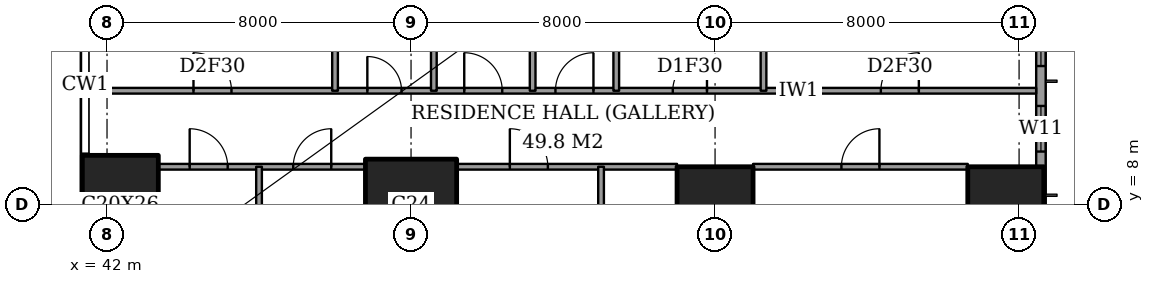
"""IFC4 building model, lengths in metres.
Left out: names, types, materials, properties, quantities, classifications, styles, units other than length and angle.
Written with IfcOpenShell. Run it as: python <this file> out.ifc"""

import sys

from ifc_helpers import new_model, si_unit, direction, frame, frame_2d, origin, origin_2d, place, context, subcontext, project, spatial, rectangle, extrude, element, fill, save


model = new_model("IFC4")
c1 = context("Model", 3, precision=1e-05, world=origin(), true_north=direction((0.0, 1.0)))
c2 = subcontext(c1, "Body", "Model", "MODEL_VIEW")
j1 = project(units=[si_unit("LENGTHUNIT", "METRE"), si_unit("PLANEANGLEUNIT", "RADIAN")], contexts=[c1])
p1 = place(None, origin())
s1 = spatial("IfcSite", under=j1, at=p1, CompositionType="ELEMENT")
p2 = place(p1, origin())
s2 = spatial("IfcBuilding", under=s1, at=p2, CompositionType="ELEMENT")
p3 = place(p2, frame((0.0, 0.0, 161.0)))
s3 = spatial("IfcBuildingStorey", under=s2, at=p3, CompositionType="ELEMENT", Elevation=161.0)
p4 = place(p3, frame((42.35, 8.0, 0.0), z_axis=(0.0, 0.0, 1.0), x_axis=(1.0, 0.0, 0.0)))
e1 = element("IfcColumn", 1, at=p4, inside=s3, PredefinedType="COLUMN", context=c2, shape_type="SweptSolid", body=[
    extrude(rectangle(XDim=2.0, YDim=2.6, at=origin_2d()), origin(), (0.0, 0.0, 1.0), 3.6),
])
p5 = place(p3, frame((50.0, 8.0, 0.0), z_axis=(0.0, 0.0, 1.0), x_axis=(1.0, 0.0, 0.0)))
e2 = element("IfcColumn", 2, at=p5, inside=s3, PredefinedType="COLUMN", context=c2, shape_type="SweptSolid", body=[
    extrude(rectangle(XDim=2.4, YDim=2.4, at=origin_2d()), origin(), (0.0, 0.0, 1.0), 3.6),
])
for number, where, z_axis, x_axis in (
    (3, (58.0, 8.0, 0.0), (0.0, 0.0, 1.0), (1.0, 0.0, 0.0)),
    (4, (65.65, 8.0, 0.0), (0.0, 0.0, 1.0), (1.0, 0.0, 0.0)),
):
    element("IfcColumn", number, at=place(p3, frame(where, z_axis=z_axis, x_axis=x_axis)), inside=s3, PredefinedType="COLUMN", context=c2, shape_type="SweptSolid", body=[
        extrude(rectangle(XDim=2.0, YDim=2.0, at=origin_2d()), origin(), (0.0, 0.0, 1.0), 3.6),
    ])
p6 = place(p3, frame((66.575, 3.175, 0.0), z_axis=(0.0, 0.0, 1.0), x_axis=(0.0, 1.0, 0.0)))
e5 = element("IfcWall", 5, at=p6, inside=s3, PredefinedType="SOLIDWALL", context=c2, shape_type="SweptSolid", body=[
    extrude(rectangle(XDim=41.65, YDim=0.25, at=frame_2d((20.825, 0.0))), origin(), (0.0, 0.0, 1.0), 3.6),
])
p7 = place(p6, frame((0.775, 0.0, 0.4)))
e6 = element("IfcOpeningElement", 6, at=p7, cuts=e5, PredefinedType="OPENING", context=c2, shape_type="SweptSolid", body=[
    extrude(rectangle(XDim=2.4, YDim=2.2, at=frame_2d((1.2, 1.1))), frame((0.0, 0.135, 0.0), z_axis=(0.0, -1.0, 0.0), x_axis=(1.0, 0.0, 0.0)), (0.0, 0.0, 1.0), 0.27),
])
p8 = place(p6, frame((6.225, 0.0, 0.4)))
e7 = element("IfcOpeningElement", 7, at=p8, cuts=e5, PredefinedType="OPENING", context=c2, shape_type="SweptSolid", body=[
    extrude(rectangle(XDim=1.2, YDim=2.2, at=frame_2d((0.6, 1.1))), frame((0.0, 0.135, 0.0), z_axis=(0.0, -1.0, 0.0), x_axis=(1.0, 0.0, 0.0)), (0.0, 0.0, 1.0), 0.27),
])
p9 = place(p6, frame((8.475, 0.0, 0.4)))
e8 = element("IfcOpeningElement", 8, at=p9, cuts=e5, PredefinedType="OPENING", context=c2, shape_type="SweptSolid", body=[
    extrude(rectangle(XDim=2.4, YDim=2.2, at=frame_2d((1.2, 1.1))), frame((0.0, 0.135, 0.0), z_axis=(0.0, -1.0, 0.0), x_axis=(1.0, 0.0, 0.0)), (0.0, 0.0, 1.0), 0.27),
])
p10 = place(p6, frame((15.775, 0.0, 0.4)))
e9 = element("IfcOpeningElement", 9, at=p10, cuts=e5, PredefinedType="OPENING", context=c2, shape_type="SweptSolid", body=[
    extrude(rectangle(XDim=2.4, YDim=2.2, at=frame_2d((1.2, 1.1))), frame((0.0, 0.135, 0.0), z_axis=(0.0, -1.0, 0.0), x_axis=(1.0, 0.0, 0.0)), (0.0, 0.0, 1.0), 0.27),
])
p11 = place(p6, frame((23.475, 0.0, 0.4)))
e10 = element("IfcOpeningElement", 10, at=p11, cuts=e5, PredefinedType="OPENING", context=c2, shape_type="SweptSolid", body=[
    extrude(rectangle(XDim=2.4, YDim=2.2, at=frame_2d((1.2, 1.1))), frame((0.0, 0.135, 0.0), z_axis=(0.0, -1.0, 0.0), x_axis=(1.0, 0.0, 0.0)), (0.0, 0.0, 1.0), 0.27),
])
p12 = place(p6, frame((30.975, 0.0, 0.4)))
e11 = element("IfcOpeningElement", 11, at=p12, cuts=e5, PredefinedType="OPENING", context=c2, shape_type="SweptSolid", body=[
    extrude(rectangle(XDim=2.4, YDim=2.2, at=frame_2d((1.2, 1.1))), frame((0.0, 0.135, 0.0), z_axis=(0.0, -1.0, 0.0), x_axis=(1.0, 0.0, 0.0)), (0.0, 0.0, 1.0), 0.27),
])
p13 = place(p6, frame((34.5, 0.0, 0.4)))
e12 = element("IfcOpeningElement", 12, at=p13, cuts=e5, PredefinedType="OPENING", context=c2, shape_type="SweptSolid", body=[
    extrude(rectangle(XDim=1.2, YDim=2.2, at=frame_2d((0.6, 1.1))), frame((0.0, 0.135, 0.0), z_axis=(0.0, -1.0, 0.0), x_axis=(1.0, 0.0, 0.0)), (0.0, 0.0, 1.0), 0.27),
])
p14 = place(p6, frame((38.475, 0.0, 0.4)))
e13 = element("IfcOpeningElement", 13, at=p14, cuts=e5, PredefinedType="OPENING", context=c2, shape_type="SweptSolid", body=[
    extrude(rectangle(XDim=2.4, YDim=2.2, at=frame_2d((1.2, 1.1))), frame((0.0, 0.135, 0.0), z_axis=(0.0, -1.0, 0.0), x_axis=(1.0, 0.0, 0.0)), (0.0, 0.0, 1.0), 0.27),
])
p15 = place(p3, frame((43.35, 9.0, 0.0), z_axis=(0.0, 0.0, 1.0), x_axis=(1.0, 0.0, 0.0)))
e14 = element("IfcWall", 14, at=p15, inside=s3, PredefinedType="PARTITIONING", context=c2, shape_type="SweptSolid", body=[
    extrude(rectangle(XDim=5.45, YDim=0.15, at=frame_2d((2.725, 0.0))), origin(), (0.0, 0.0, 1.0), 3.35),
])
p16 = place(p15, frame((3.55, 0.0, 0.0)))
e15 = element("IfcOpeningElement", 15, at=p16, cuts=e14, PredefinedType="OPENING", context=c2, shape_type="SweptSolid", body=[
    extrude(rectangle(XDim=1.0, YDim=2.1, at=frame_2d((0.5, 1.05))), frame((0.0, 0.085, 0.0), z_axis=(0.0, -1.0, 0.0), x_axis=(1.0, 0.0, 0.0)), (0.0, 0.0, 1.0), 0.17),
])
p17 = place(p15, frame((0.825, 0.0, 0.0)))
e16 = element("IfcOpeningElement", 16, at=p17, cuts=e14, PredefinedType="OPENING", context=c2, shape_type="SweptSolid", body=[
    extrude(rectangle(XDim=1.0, YDim=2.1, at=frame_2d((0.5, 1.05))), frame((0.0, 0.085, 0.0), z_axis=(0.0, -1.0, 0.0), x_axis=(1.0, 0.0, 0.0)), (0.0, 0.0, 1.0), 0.17),
])
p18 = place(p3, frame((51.2, 9.0, 0.0), z_axis=(0.0, 0.0, 1.0), x_axis=(1.0, 0.0, 0.0)))
e17 = element("IfcWall", 17, at=p18, inside=s3, PredefinedType="PARTITIONING", context=c2, shape_type="SweptSolid", body=[
    extrude(rectangle(XDim=5.8, YDim=0.15, at=frame_2d((2.9, 0.0))), origin(), (0.0, 0.0, 1.0), 3.35),
])
p19 = place(p18, frame((1.4, 0.0, 0.0)))
e18 = element("IfcOpeningElement", 18, at=p19, cuts=e17, PredefinedType="OPENING", context=c2, shape_type="SweptSolid", body=[
    extrude(rectangle(XDim=1.0, YDim=2.1, at=frame_2d((0.5, 1.05))), frame((0.0, 0.085, 0.0), z_axis=(0.0, -1.0, 0.0), x_axis=(1.0, 0.0, 0.0)), (0.0, 0.0, 1.0), 0.17),
])
p20 = place(p3, frame((59.0, 9.0, 0.0), z_axis=(0.0, 0.0, 1.0), x_axis=(1.0, 0.0, 0.0)))
e19 = element("IfcWall", 19, at=p20, inside=s3, PredefinedType="PARTITIONING", context=c2, shape_type="SweptSolid", body=[
    extrude(rectangle(XDim=5.65, YDim=0.15, at=frame_2d((2.825, 0.0))), origin(), (0.0, 0.0, 1.0), 3.35),
])
p21 = place(p20, frame((2.325, 0.0, 0.0)))
e20 = element("IfcOpeningElement", 20, at=p21, cuts=e19, PredefinedType="OPENING", context=c2, shape_type="SweptSolid", body=[
    extrude(rectangle(XDim=1.0, YDim=2.1, at=frame_2d((0.5, 1.05))), frame((0.0, 0.085, 0.0), z_axis=(0.0, -1.0, 0.0), x_axis=(1.0, 0.0, 0.0)), (0.0, 0.0, 1.0), 0.17),
])
p22 = place(p3, frame((41.439, 11.0, 0.0), z_axis=(0.0, 0.0, 1.0), x_axis=(1.0, 0.0, 0.0)))
e21 = element("IfcWall", 21, at=p22, inside=s3, PredefinedType="PARTITIONING", context=c2, shape_type="SweptSolid", body=[
    extrude(rectangle(XDim=25.011, YDim=0.15, at=frame_2d((12.505, 0.0))), origin(), (0.0, 0.0, 1.0), 3.35),
])
p23 = place(p22, frame((12.361, 0.0, 0.0)))
e22 = element("IfcOpeningElement", 22, at=p23, cuts=e21, PredefinedType="OPENING", context=c2, shape_type="SweptSolid", body=[
    extrude(rectangle(XDim=1.0, YDim=2.1, at=frame_2d((0.5, 1.05))), frame((0.0, 0.085, 0.0), z_axis=(0.0, -1.0, 0.0), x_axis=(1.0, 0.0, 0.0)), (0.0, 0.0, 1.0), 0.17),
])
p24 = place(p22, frame((20.924, 0.0, 0.0)))
e23 = element("IfcOpeningElement", 23, at=p24, cuts=e21, PredefinedType="OPENING", context=c2, shape_type="SweptSolid", body=[
    extrude(rectangle(XDim=1.0, YDim=2.1, at=frame_2d((0.5, 1.05))), frame((0.0, 0.085, 0.0), z_axis=(0.0, -1.0, 0.0), x_axis=(1.0, 0.0, 0.0)), (0.0, 0.0, 1.0), 0.17),
])
p25 = place(p22, frame((15.448, 0.0, 0.0)))
e24 = element("IfcOpeningElement", 24, at=p25, cuts=e21, PredefinedType="OPENING", context=c2, shape_type="SweptSolid", body=[
    extrude(rectangle(XDim=0.9, YDim=2.1, at=frame_2d((0.45, 1.05))), frame((0.0, 0.085, 0.0), z_axis=(0.0, -1.0, 0.0), x_axis=(1.0, 0.0, 0.0)), (0.0, 0.0, 1.0), 0.17),
])
p26 = place(p22, frame((9.961, 0.0, 0.0)))
e25 = element("IfcOpeningElement", 25, at=p26, cuts=e21, PredefinedType="OPENING", context=c2, shape_type="SweptSolid", body=[
    extrude(rectangle(XDim=1.0, YDim=2.1, at=frame_2d((0.5, 1.05))), frame((0.0, 0.085, 0.0), z_axis=(0.0, -1.0, 0.0), x_axis=(1.0, 0.0, 0.0)), (0.0, 0.0, 1.0), 0.17),
])
p27 = place(p22, frame((7.411, 0.0, 0.0)))
e26 = element("IfcOpeningElement", 26, at=p27, cuts=e21, PredefinedType="OPENING", context=c2, shape_type="SweptSolid", body=[
    extrude(rectangle(XDim=0.9, YDim=2.1, at=frame_2d((0.45, 1.05))), frame((0.0, 0.085, 0.0), z_axis=(0.0, -1.0, 0.0), x_axis=(1.0, 0.0, 0.0)), (0.0, 0.0, 1.0), 0.17),
])
p28 = place(p22, frame((2.836, 0.0, 0.0)))
e27 = element("IfcOpeningElement", 27, at=p28, cuts=e21, PredefinedType="OPENING", context=c2, shape_type="SweptSolid", body=[
    extrude(rectangle(XDim=1.0, YDim=2.1, at=frame_2d((0.5, 1.05))), frame((0.0, 0.085, 0.0), z_axis=(0.0, -1.0, 0.0), x_axis=(1.0, 0.0, 0.0)), (0.0, 0.0, 1.0), 0.17),
])
p29 = place(p3, frame((46.0, -0.45, 0.0), z_axis=(0.0, 0.0, 1.0), x_axis=(0.0, 1.0, 0.0)))
e28 = element("IfcWall", 28, at=p29, inside=s3, PredefinedType="PARTITIONING", context=c2, shape_type="SweptSolid", body=[
    extrude(rectangle(XDim=9.45, YDim=0.15, at=frame_2d((4.725, 0.0))), origin(), (0.0, 0.0, 1.0), 3.35),
])
p30 = place(p3, frame((48.0, 11.0, 0.0), z_axis=(0.0, 0.0, 1.0), x_axis=(0.0, 1.0, 0.0)))
e29 = element("IfcWall", 29, at=p30, inside=s3, PredefinedType="PARTITIONING", context=c2, shape_type="SweptSolid", body=[
    extrude(rectangle(XDim=6.5, YDim=0.15, at=frame_2d((3.25, 0.0))), origin(), (0.0, 0.0, 1.0), 3.35),
])
p31 = place(p3, frame((50.6, 11.0, 0.0), z_axis=(0.0, 0.0, 1.0), x_axis=(0.0, 1.0, 0.0)))
e30 = element("IfcWall", 30, at=p31, inside=s3, PredefinedType="PARTITIONING", context=c2, shape_type="SweptSolid", body=[
    extrude(rectangle(XDim=3.8, YDim=0.15, at=frame_2d((1.9, 0.0))), origin(), (0.0, 0.0, 1.0), 3.35),
])
p32 = place(p3, frame((53.2, 11.0, 0.0), z_axis=(0.0, 0.0, 1.0), x_axis=(0.0, 1.0, 0.0)))
e31 = element("IfcWall", 31, at=p32, inside=s3, PredefinedType="PARTITIONING", context=c2, shape_type="SweptSolid", body=[
    extrude(rectangle(XDim=6.5, YDim=0.15, at=frame_2d((3.25, 0.0))), origin(), (0.0, 0.0, 1.0), 3.35),
])
p33 = place(p3, frame((55.0, -0.45, 0.0), z_axis=(0.0, 0.0, 1.0), x_axis=(0.0, 1.0, 0.0)))
e32 = element("IfcWall", 32, at=p33, inside=s3, PredefinedType="PARTITIONING", context=c2, shape_type="SweptSolid", body=[
    extrude(rectangle(XDim=9.45, YDim=0.15, at=frame_2d((4.725, 0.0))), origin(), (0.0, 0.0, 1.0), 3.35),
])
p34 = place(p3, frame((55.4, 11.0, 0.0), z_axis=(0.0, 0.0, 1.0), x_axis=(0.0, 1.0, 0.0)))
e33 = element("IfcWall", 33, at=p34, inside=s3, PredefinedType="PARTITIONING", context=c2, shape_type="SweptSolid", body=[
    extrude(rectangle(XDim=10.6, YDim=0.15, at=frame_2d((5.3, 0.0))), origin(), (0.0, 0.0, 1.0), 3.35),
])
p35 = place(p34, frame((8.05, 0.0, 0.0)))
e34 = element("IfcOpeningElement", 34, at=p35, cuts=e33, PredefinedType="OPENING", context=c2, shape_type="SweptSolid", body=[
    extrude(rectangle(XDim=1.0, YDim=2.1, at=frame_2d((0.5, 1.05))), frame((0.0, 0.085, 0.0), z_axis=(0.0, -1.0, 0.0), x_axis=(1.0, 0.0, 0.0)), (0.0, 0.0, 1.0), 0.17),
])
p36 = place(p3, frame((59.275, 11.0, 0.0), z_axis=(0.0, 0.0, 1.0), x_axis=(0.0, 1.0, 0.0)))
e35 = element("IfcWall", 35, at=p36, inside=s3, PredefinedType="PARTITIONING", context=c2, shape_type="SweptSolid", body=[
    extrude(rectangle(XDim=3.8, YDim=0.15, at=frame_2d((1.9, 0.0))), origin(), (0.0, 0.0, 1.0), 3.35),
])
p37 = place(p8, origin())
e36 = element("IfcWindow", 36, at=p37, inside=s3, PartitioningType="SINGLE_PANEL", PredefinedType="WINDOW", context=c2, shape_type="SweptSolid", body=[
    extrude(rectangle(XDim=1.2, YDim=2.2, at=frame_2d((0.6, 1.1))), frame((0.0, 0.03, 0.0), z_axis=(0.0, -1.0, 0.0), x_axis=(1.0, 0.0, 0.0)), (0.0, 0.0, 1.0), 0.06),
])
fill(e7, e36)
p38 = place(p9, origin())
e37 = element("IfcWindow", 37, at=p38, inside=s3, PartitioningType="SINGLE_PANEL", PredefinedType="WINDOW", context=c2, shape_type="SweptSolid", body=[
    extrude(rectangle(XDim=2.4, YDim=2.2, at=frame_2d((1.2, 1.1))), frame((0.0, 0.03, 0.0), z_axis=(0.0, -1.0, 0.0), x_axis=(1.0, 0.0, 0.0)), (0.0, 0.0, 1.0), 0.06),
])
fill(e8, e37)
p39 = place(p21, origin())
e38 = element("IfcDoor", 38, at=p39, inside=s3, OperationType="SINGLE_SWING_LEFT", PredefinedType="DOOR", context=c2, shape_type="SweptSolid", body=[
    extrude(rectangle(XDim=1.0, YDim=2.1, at=frame_2d((0.5, 1.05))), frame((0.0, 0.025, 0.0), z_axis=(0.0, -1.0, 0.0), x_axis=(1.0, 0.0, 0.0)), (0.0, 0.0, 1.0), 0.05),
])
fill(e20, e38)
p40 = place(p19, origin())
e39 = element("IfcDoor", 39, at=p40, inside=s3, OperationType="SINGLE_SWING_RIGHT", PredefinedType="DOOR", context=c2, shape_type="SweptSolid", body=[
    extrude(rectangle(XDim=1.0, YDim=2.1, at=frame_2d((0.5, 1.05))), frame((0.0, 0.025, 0.0), z_axis=(0.0, -1.0, 0.0), x_axis=(1.0, 0.0, 0.0)), (0.0, 0.0, 1.0), 0.05),
])
fill(e18, e39)
p41 = place(p16, origin())
e40 = element("IfcDoor", 40, at=p41, inside=s3, OperationType="SINGLE_SWING_LEFT", PredefinedType="DOOR", context=c2, shape_type="SweptSolid", body=[
    extrude(rectangle(XDim=1.0, YDim=2.1, at=frame_2d((0.5, 1.05))), frame((0.0, 0.025, 0.0), z_axis=(0.0, -1.0, 0.0), x_axis=(1.0, 0.0, 0.0)), (0.0, 0.0, 1.0), 0.05),
])
fill(e15, e40)
p42 = place(p17, origin())
e41 = element("IfcDoor", 41, at=p42, inside=s3, OperationType="SINGLE_SWING_RIGHT", PredefinedType="DOOR", context=c2, shape_type="SweptSolid", body=[
    extrude(rectangle(XDim=1.0, YDim=2.1, at=frame_2d((0.5, 1.05))), frame((0.0, 0.025, 0.0), z_axis=(0.0, -1.0, 0.0), x_axis=(1.0, 0.0, 0.0)), (0.0, 0.0, 1.0), 0.05),
])
fill(e16, e41)
p43 = place(p23, origin())
e42 = element("IfcDoor", 42, at=p43, inside=s3, OperationType="SINGLE_SWING_LEFT", PredefinedType="DOOR", context=c2, shape_type="SweptSolid", body=[
    extrude(rectangle(XDim=1.0, YDim=2.1, at=frame_2d((0.5, 1.05))), frame((0.0, 0.025, 0.0), z_axis=(0.0, -1.0, 0.0), x_axis=(1.0, 0.0, 0.0)), (0.0, 0.0, 1.0), 0.05),
])
fill(e22, e42)
p44 = place(p24, origin())
e43 = element("IfcDoor", 43, at=p44, inside=s3, OperationType="SINGLE_SWING_LEFT", PredefinedType="DOOR", context=c2, shape_type="SweptSolid", body=[
    extrude(rectangle(XDim=1.0, YDim=2.1, at=frame_2d((0.5, 1.05))), frame((0.0, 0.025, 0.0), z_axis=(0.0, -1.0, 0.0), x_axis=(1.0, 0.0, 0.0)), (0.0, 0.0, 1.0), 0.05),
])
fill(e23, e43)
p45 = place(p25, origin())
e44 = element("IfcDoor", 44, at=p45, inside=s3, OperationType="SINGLE_SWING_LEFT", PredefinedType="DOOR", context=c2, shape_type="SweptSolid", body=[
    extrude(rectangle(XDim=0.9, YDim=2.1, at=frame_2d((0.45, 1.05))), frame((0.0, 0.025, 0.0), z_axis=(0.0, -1.0, 0.0), x_axis=(1.0, 0.0, 0.0)), (0.0, 0.0, 1.0), 0.05),
])
fill(e24, e44)
p46 = place(p26, origin())
e45 = element("IfcDoor", 45, at=p46, inside=s3, OperationType="SINGLE_SWING_RIGHT", PredefinedType="DOOR", context=c2, shape_type="SweptSolid", body=[
    extrude(rectangle(XDim=1.0, YDim=2.1, at=frame_2d((0.5, 1.05))), frame((0.0, 0.025, 0.0), z_axis=(0.0, -1.0, 0.0), x_axis=(1.0, 0.0, 0.0)), (0.0, 0.0, 1.0), 0.05),
])
fill(e25, e45)
p47 = place(p27, origin())
e46 = element("IfcDoor", 46, at=p47, inside=s3, OperationType="SINGLE_SWING_RIGHT", PredefinedType="DOOR", context=c2, shape_type="SweptSolid", body=[
    extrude(rectangle(XDim=0.9, YDim=2.1, at=frame_2d((0.45, 1.05))), frame((0.0, 0.025, 0.0), z_axis=(0.0, -1.0, 0.0), x_axis=(1.0, 0.0, 0.0)), (0.0, 0.0, 1.0), 0.05),
])
fill(e26, e46)
p48 = place(p28, origin())
e47 = element("IfcDoor", 47, at=p48, inside=s3, OperationType="SINGLE_SWING_RIGHT", PredefinedType="DOOR", context=c2, shape_type="SweptSolid", body=[
    extrude(rectangle(XDim=1.0, YDim=2.1, at=frame_2d((0.5, 1.05))), frame((0.0, 0.025, 0.0), z_axis=(0.0, -1.0, 0.0), x_axis=(1.0, 0.0, 0.0)), (0.0, 0.0, 1.0), 0.05),
])
fill(e27, e47)
save(model, sys.argv[1])
